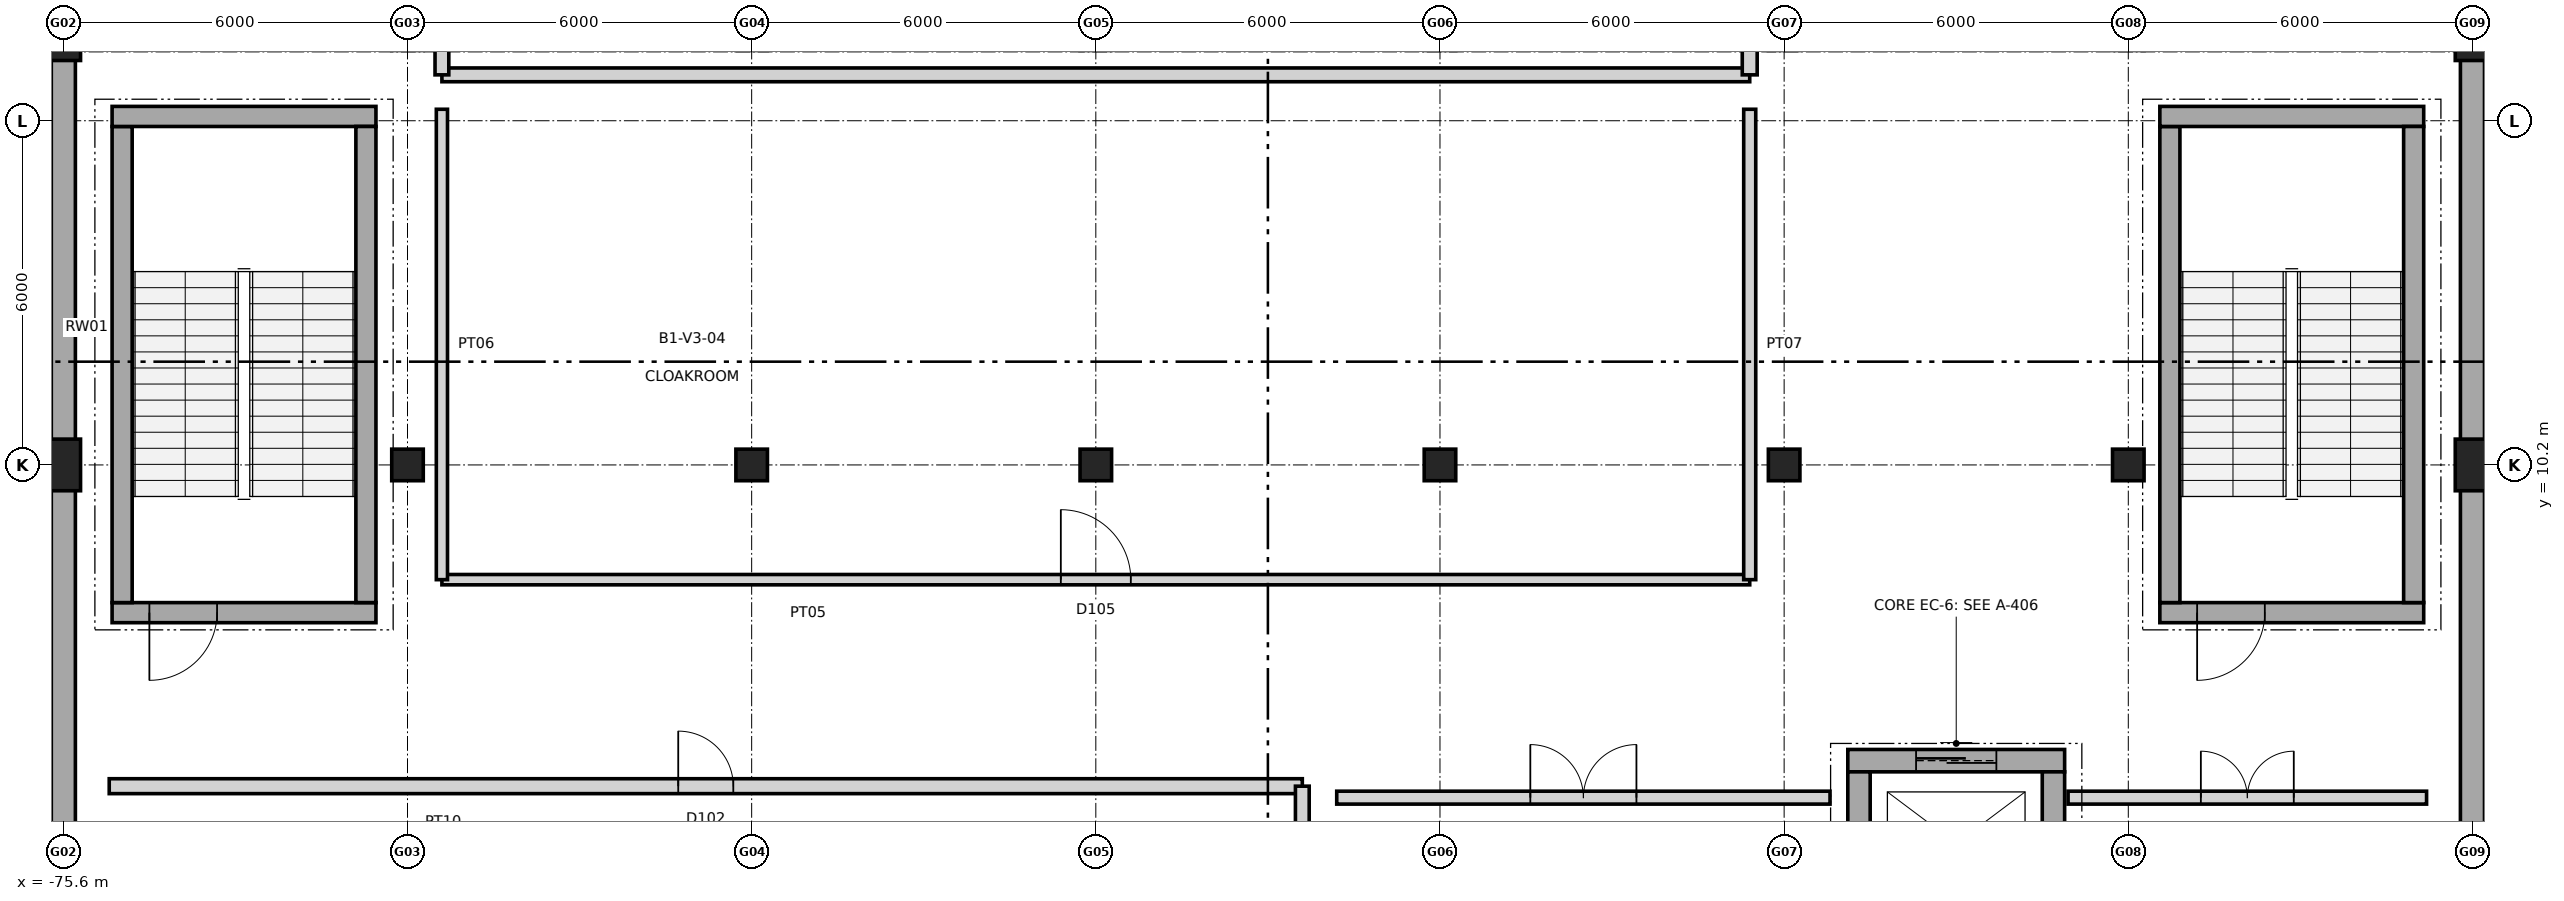
"""IFC4 building model, lengths in metres.
Left out: names, types, materials, properties, quantities, classifications, styles, units other than length and angle.
Written with IfcOpenShell. Run it as: python <this file> out.ifc"""

import sys

from ifc_helpers import new_model, si_unit, direction, frame, frame_2d, origin, origin_2d, place, context, subcontext, project, spatial, rectangle, extrude, element, fill, save


model = new_model("IFC4")
c1 = context("Model", 3, precision=1e-05, world=origin(), true_north=direction((0.0, 1.0)))
c2 = subcontext(c1, "Body", "Model", "MODEL_VIEW")
j1 = project(units=[si_unit("LENGTHUNIT", "METRE"), si_unit("PLANEANGLEUNIT", "RADIAN")], contexts=[c1])
p1 = place(None, origin())
s1 = spatial("IfcSite", under=j1, at=p1, CompositionType="ELEMENT")
p2 = place(p1, origin())
s2 = spatial("IfcBuilding", under=s1, at=p2, CompositionType="ELEMENT")
p3 = place(p2, frame((0.0, 0.0, -5.4)))
s3 = spatial("IfcBuildingStorey", under=s2, at=p3, CompositionType="ELEMENT", Elevation=-5.4)
for number, where, z_axis, x_axis in (
    (1, (-75.6, 10.2, 0.0), (0.0, 0.0, 1.0), (1.0, 0.0, 0.0)),
    (2, (-75.6, 17.7, 0.0), (0.0, 0.0, 1.0), (1.0, 0.0, 0.0)),
):
    element("IfcColumn", number, at=place(p3, frame(where, z_axis=z_axis, x_axis=x_axis)), inside=s3, PredefinedType="COLUMN", context=c2, shape_type="SweptSolid", body=[
        extrude(rectangle(XDim=0.6, YDim=0.9, at=origin_2d()), origin(), (0.0, 0.0, 1.0), 5.4),
    ])
for number, where, z_axis, x_axis in (
    (3, (-69.6, 10.2, 0.0), (0.0, 0.0, 1.0), (1.0, 0.0, 0.0)),
    (4, (-63.6, 10.2, 0.0), (0.0, 0.0, 1.0), (1.0, 0.0, 0.0)),
    (5, (-57.6, 10.2, 0.0), (0.0, 0.0, 1.0), (1.0, 0.0, 0.0)),
    (6, (-51.6, 10.2, 0.0), (0.0, 0.0, 1.0), (1.0, 0.0, 0.0)),
    (7, (-45.6, 10.2, 0.0), (0.0, 0.0, 1.0), (1.0, 0.0, 0.0)),
    (8, (-39.6, 10.2, 0.0), (0.0, 0.0, 1.0), (1.0, 0.0, 0.0)),
):
    element("IfcColumn", number, at=place(p3, frame(where, z_axis=z_axis, x_axis=x_axis)), inside=s3, PredefinedType="COLUMN", context=c2, shape_type="SweptSolid", body=[
        extrude(rectangle(XDim=0.55, YDim=0.55, at=origin_2d()), origin(), (0.0, 0.0, 1.0), 5.4),
    ])
for number, where, z_axis, x_axis in (
    (9, (-33.6, 10.2, 0.0), (0.0, 0.0, 1.0), (1.0, 0.0, 0.0)),
    (10, (-33.6, 17.7, 0.0), (0.0, 0.0, 1.0), (1.0, 0.0, 0.0)),
):
    element("IfcColumn", number, at=place(p3, frame(where, z_axis=z_axis, x_axis=x_axis)), inside=s3, PredefinedType="COLUMN", context=c2, shape_type="SweptSolid", body=[
        extrude(rectangle(XDim=0.6, YDim=0.9, at=origin_2d()), origin(), (0.0, 0.0, 1.0), 5.4),
    ])
for number, where, z_axis, x_axis in (
    (11, (-75.6, -16.35, 0.0), (0.0, 0.0, 1.0), (0.0, 1.0, 0.0)),
    (12, (-33.6, -16.35, 0.0), (0.0, 0.0, 1.0), (0.0, 1.0, 0.0)),
):
    element("IfcWall", number, at=place(p3, frame(where, z_axis=z_axis, x_axis=x_axis)), inside=s3, PredefinedType="USERDEFINED", context=c2, shape_type="SweptSolid", body=[
        extrude(rectangle(XDim=57.9, YDim=0.42, at=frame_2d((28.95, 0.0))), origin(), (0.0, 0.0, 1.0), 5.11),
    ])
p4 = place(p3, frame((-70.15, 7.625, 0.0), z_axis=(0.0, 0.0, 1.0), x_axis=(-1.0, 0.0, 0.0)))
e13 = element("IfcWall", 13, at=p4, inside=s3, PredefinedType="SHEAR", context=c2, shape_type="SweptSolid", body=[
    extrude(rectangle(XDim=4.6, YDim=0.35, at=frame_2d((2.3, 0.0))), origin(), (0.0, 0.0, 1.0), 5.4),
])
p5 = place(p4, frame((2.77, 0.0, 0.0)))
e14 = element("IfcOpeningElement", 14, at=p5, cuts=e13, PredefinedType="OPENING", context=c2, shape_type="SweptSolid", body=[
    extrude(rectangle(XDim=1.18, YDim=2.15, at=frame_2d((0.59, 1.075))), frame((0.0, 0.185, 0.0), z_axis=(0.0, -1.0, 0.0), x_axis=(1.0, 0.0, 0.0)), (0.0, 0.0, 1.0), 0.37),
])
p6 = place(p3, frame((-74.575, 7.8, 0.0), z_axis=(0.0, 0.0, 1.0), x_axis=(0.0, 1.0, 0.0)))
e15 = element("IfcWall", 15, at=p6, inside=s3, PredefinedType="SHEAR", context=c2, shape_type="SweptSolid", body=[
    extrude(rectangle(XDim=8.3, YDim=0.35, at=frame_2d((4.15, 0.0))), origin(), (0.0, 0.0, 1.0), 5.4),
])
p7 = place(p3, frame((-74.75, 16.275, 0.0), z_axis=(0.0, 0.0, 1.0), x_axis=(1.0, 0.0, 0.0)))
e16 = element("IfcWall", 16, at=p7, inside=s3, PredefinedType="SHEAR", context=c2, shape_type="SweptSolid", body=[
    extrude(rectangle(XDim=4.6, YDim=0.35, at=frame_2d((2.3, 0.0))), origin(), (0.0, 0.0, 1.0), 5.4),
])
p8 = place(p3, frame((-70.325, 16.1, 0.0), z_axis=(0.0, 0.0, 1.0), x_axis=(0.0, -1.0, 0.0)))
e17 = element("IfcWall", 17, at=p8, inside=s3, PredefinedType="SHEAR", context=c2, shape_type="SweptSolid", body=[
    extrude(rectangle(XDim=8.3, YDim=0.35, at=frame_2d((4.15, 0.0))), origin(), (0.0, 0.0, 1.0), 5.4),
])
p9 = place(p3, frame((-34.45, 7.625, 0.0), z_axis=(0.0, 0.0, 1.0), x_axis=(-1.0, 0.0, 0.0)))
e18 = element("IfcWall", 18, at=p9, inside=s3, PredefinedType="SHEAR", context=c2, shape_type="SweptSolid", body=[
    extrude(rectangle(XDim=4.6, YDim=0.35, at=frame_2d((2.3, 0.0))), origin(), (0.0, 0.0, 1.0), 5.4),
])
p10 = place(p9, frame((2.77, 0.0, 0.0)))
e19 = element("IfcOpeningElement", 19, at=p10, cuts=e18, PredefinedType="OPENING", context=c2, shape_type="SweptSolid", body=[
    extrude(rectangle(XDim=1.18, YDim=2.15, at=frame_2d((0.59, 1.075))), frame((0.0, 0.185, 0.0), z_axis=(0.0, -1.0, 0.0), x_axis=(1.0, 0.0, 0.0)), (0.0, 0.0, 1.0), 0.37),
])
p11 = place(p3, frame((-38.875, 7.8, 0.0), z_axis=(0.0, 0.0, 1.0), x_axis=(0.0, 1.0, 0.0)))
e20 = element("IfcWall", 20, at=p11, inside=s3, PredefinedType="SHEAR", context=c2, shape_type="SweptSolid", body=[
    extrude(rectangle(XDim=8.3, YDim=0.35, at=frame_2d((4.15, 0.0))), origin(), (0.0, 0.0, 1.0), 5.4),
])
p12 = place(p3, frame((-39.05, 16.275, 0.0), z_axis=(0.0, 0.0, 1.0), x_axis=(1.0, 0.0, 0.0)))
e21 = element("IfcWall", 21, at=p12, inside=s3, PredefinedType="SHEAR", context=c2, shape_type="SweptSolid", body=[
    extrude(rectangle(XDim=4.6, YDim=0.35, at=frame_2d((2.3, 0.0))), origin(), (0.0, 0.0, 1.0), 5.4),
])
p13 = place(p3, frame((-34.625, 16.1, 0.0), z_axis=(0.0, 0.0, 1.0), x_axis=(0.0, -1.0, 0.0)))
e22 = element("IfcWall", 22, at=p13, inside=s3, PredefinedType="SHEAR", context=c2, shape_type="SweptSolid", body=[
    extrude(rectangle(XDim=8.3, YDim=0.35, at=frame_2d((4.15, 0.0))), origin(), (0.0, 0.0, 1.0), 5.4),
])
p14 = place(p3, frame((-44.49, 5.045, 0.0), z_axis=(0.0, 0.0, 1.0), x_axis=(1.0, 0.0, 0.0)))
e23 = element("IfcWall", 23, at=p14, inside=s3, PredefinedType="SHEAR", context=c2, shape_type="SweptSolid", body=[
    extrude(rectangle(XDim=3.78, YDim=0.39, at=frame_2d((1.89, 0.0))), origin(), (0.0, 0.0, 1.0), 5.4),
])
p15 = place(p14, frame((1.19, 0.0, 0.0)))
e24 = element("IfcOpeningElement", 24, at=p15, cuts=e23, PredefinedType="OPENING", context=c2, shape_type="SweptSolid", body=[
    extrude(rectangle(XDim=1.4, YDim=2.2, at=frame_2d((0.7, 1.1))), frame((0.0, 0.205, 0.0), z_axis=(0.0, -1.0, 0.0), x_axis=(1.0, 0.0, 0.0)), (0.0, 0.0, 1.0), 0.41),
])
for number, where, z_axis, x_axis in (
    (25, (-44.295, 2.35, 0.0), (0.0, 0.0, 1.0), (0.0, 1.0, 0.0)),
    (26, (-40.905, 4.85, 0.0), (0.0, 0.0, 1.0), (0.0, -1.0, 0.0)),
):
    element("IfcWall", number, at=place(p3, frame(where, z_axis=z_axis, x_axis=x_axis)), inside=s3, PredefinedType="SHEAR", context=c2, shape_type="SweptSolid", body=[
        extrude(rectangle(XDim=2.5, YDim=0.39, at=frame_2d((1.25, 0.0))), origin(), (0.0, 0.0, 1.0), 5.4),
    ])
p16 = place(p3, frame((-74.8, 4.6, 0.0), z_axis=(0.0, 0.0, 1.0), x_axis=(1.0, 0.0, 0.0)))
e27 = element("IfcWall", 27, at=p16, inside=s3, PredefinedType="PARTITIONING", context=c2, shape_type="SweptSolid", body=[
    extrude(rectangle(XDim=20.8, YDim=0.26, at=frame_2d((10.4, 0.0))), origin(), (0.0, 0.0, 1.0), 5.02),
])
p17 = place(p16, frame((9.92, 0.0, 0.0)))
e28 = element("IfcOpeningElement", 28, at=p17, cuts=e27, PredefinedType="OPENING", context=c2, shape_type="SweptSolid", body=[
    extrude(rectangle(XDim=0.96, YDim=2.2, at=frame_2d((0.48, 1.1))), frame((0.0, 0.14, 0.0), z_axis=(0.0, -1.0, 0.0), x_axis=(1.0, 0.0, 0.0)), (0.0, 0.0, 1.0), 0.28),
])
p18 = place(p3, frame((-54.0, -16.0, 0.0), z_axis=(0.0, 0.0, 1.0), x_axis=(0.0, 1.0, 0.0)))
e29 = element("IfcWall", 29, at=p18, inside=s3, PredefinedType="PARTITIONING", context=c2, shape_type="SweptSolid", body=[
    extrude(rectangle(XDim=20.6, YDim=0.24, at=frame_2d((10.3, 0.0))), origin(), (0.0, 0.0, 1.0), 5.02),
])
p19 = place(p3, frame((-53.4, 4.4, 0.0), z_axis=(0.0, 0.0, 1.0), x_axis=(1.0, 0.0, 0.0)))
e30 = element("IfcWall", 30, at=p19, inside=s3, PredefinedType="PARTITIONING", context=c2, shape_type="SweptSolid", body=[
    extrude(rectangle(XDim=8.6, YDim=0.225, at=frame_2d((4.3, 0.0))), origin(), (0.0, 0.0, 1.0), 5.02),
])
p20 = place(p19, frame((3.375, 0.0, 0.0)))
e31 = element("IfcOpeningElement", 31, at=p20, cuts=e30, PredefinedType="OPENING", context=c2, shape_type="SweptSolid", body=[
    extrude(rectangle(XDim=1.85, YDim=2.3, at=frame_2d((0.925, 1.15))), frame((0.0, 0.123, 0.0), z_axis=(0.0, -1.0, 0.0), x_axis=(1.0, 0.0, 0.0)), (0.0, 0.0, 1.0), 0.245),
])
p21 = place(p3, frame((-69.0, 17.0, 0.0), z_axis=(0.0, 0.0, 1.0), x_axis=(1.0, 0.0, 0.0)))
e32 = element("IfcWall", 32, at=p21, inside=s3, PredefinedType="PARTITIONING", context=c2, shape_type="SweptSolid", body=[
    extrude(rectangle(XDim=22.8, YDim=0.24, at=frame_2d((11.4, 0.0))), origin(), (0.0, 0.0, 1.0), 5.02),
])
p22 = place(p3, frame((-69.0, 17.0, 0.0), z_axis=(0.0, 0.0, 1.0), x_axis=(0.0, 1.0, 0.0)))
e33 = element("IfcWall", 33, at=p22, inside=s3, PredefinedType="PARTITIONING", context=c2, shape_type="SweptSolid", body=[
    extrude(rectangle(XDim=7.4, YDim=0.24, at=frame_2d((3.7, 0.0))), origin(), (0.0, 0.0, 1.0), 5.02),
])
p23 = place(p22, frame((1.45, 0.0, 0.0)))
e34 = element("IfcOpeningElement", 34, at=p23, cuts=e33, PredefinedType="OPENING", context=c2, shape_type="SweptSolid", body=[
    extrude(rectangle(XDim=1.12, YDim=2.25, at=frame_2d((0.56, 1.125))), frame((0.0, 0.13, 0.0), z_axis=(0.0, -1.0, 0.0), x_axis=(1.0, 0.0, 0.0)), (0.0, 0.0, 1.0), 0.26),
])
p24 = place(p3, frame((-46.2, 17.0, 0.0), z_axis=(0.0, 0.0, 1.0), x_axis=(0.0, 1.0, 0.0)))
e35 = element("IfcWall", 35, at=p24, inside=s3, PredefinedType="PARTITIONING", context=c2, shape_type="SweptSolid", body=[
    extrude(rectangle(XDim=7.4, YDim=0.26, at=frame_2d((3.7, 0.0))), origin(), (0.0, 0.0, 1.0), 5.02),
])
p25 = place(p3, frame((-69.0, 8.2, 0.0), z_axis=(0.0, 0.0, 1.0), x_axis=(1.0, 0.0, 0.0)))
e36 = element("IfcWall", 36, at=p25, inside=s3, PredefinedType="PARTITIONING", context=c2, shape_type="SweptSolid", body=[
    extrude(rectangle(XDim=22.8, YDim=0.18, at=frame_2d((11.4, 0.0))), origin(), (0.0, 0.0, 1.0), 5.02),
])
p26 = place(p25, frame((10.79, 0.0, 0.0)))
e37 = element("IfcOpeningElement", 37, at=p26, cuts=e36, PredefinedType="OPENING", context=c2, shape_type="SweptSolid", body=[
    extrude(rectangle(XDim=1.22, YDim=2.3, at=frame_2d((0.61, 1.15))), frame((0.0, 0.1, 0.0), z_axis=(0.0, -1.0, 0.0), x_axis=(1.0, 0.0, 0.0)), (0.0, 0.0, 1.0), 0.2),
])
p27 = place(p3, frame((-69.0, 8.2, 0.0), z_axis=(0.0, 0.0, 1.0), x_axis=(0.0, 1.0, 0.0)))
e38 = element("IfcWall", 38, at=p27, inside=s3, PredefinedType="PARTITIONING", context=c2, shape_type="SweptSolid", body=[
    extrude(rectangle(XDim=8.2, YDim=0.195, at=frame_2d((4.1, 0.0))), origin(), (0.0, 0.0, 1.0), 5.02),
])
p28 = place(p3, frame((-46.2, 8.2, 0.0), z_axis=(0.0, 0.0, 1.0), x_axis=(0.0, 1.0, 0.0)))
e39 = element("IfcWall", 39, at=p28, inside=s3, PredefinedType="PARTITIONING", context=c2, shape_type="SweptSolid", body=[
    extrude(rectangle(XDim=8.2, YDim=0.21, at=frame_2d((4.1, 0.0))), origin(), (0.0, 0.0, 1.0), 5.02),
])
p29 = place(p3, frame((-40.65, 4.4, 0.0), z_axis=(0.0, 0.0, 1.0), x_axis=(1.0, 0.0, 0.0)))
e40 = element("IfcWall", 40, at=p29, inside=s3, PredefinedType="PARTITIONING", context=c2, shape_type="SweptSolid", body=[
    extrude(rectangle(XDim=6.25, YDim=0.225, at=frame_2d((3.125, 0.0))), origin(), (0.0, 0.0, 1.0), 5.02),
])
p30 = place(p29, frame((2.315, 0.0, 0.0)))
e41 = element("IfcOpeningElement", 41, at=p30, cuts=e40, PredefinedType="OPENING", context=c2, shape_type="SweptSolid", body=[
    extrude(rectangle(XDim=1.62, YDim=2.2, at=frame_2d((0.81, 1.1))), frame((0.0, 0.123, 0.0), z_axis=(0.0, -1.0, 0.0), x_axis=(1.0, 0.0, 0.0)), (0.0, 0.0, 1.0), 0.245),
])
p31 = place(p5, origin())
e42 = element("IfcDoor", 42, at=p31, inside=s3, OperationType="SINGLE_SWING_RIGHT", PredefinedType="DOOR", context=c2, shape_type="SweptSolid", body=[
    extrude(rectangle(XDim=1.18, YDim=2.15, at=frame_2d((0.59, 1.075))), frame((0.0, 0.025, 0.0), z_axis=(0.0, -1.0, 0.0), x_axis=(1.0, 0.0, 0.0)), (0.0, 0.0, 1.0), 0.05),
])
fill(e14, e42)
p32 = place(p10, origin())
e43 = element("IfcDoor", 43, at=p32, inside=s3, OperationType="SINGLE_SWING_RIGHT", PredefinedType="DOOR", context=c2, shape_type="SweptSolid", body=[
    extrude(rectangle(XDim=1.18, YDim=2.15, at=frame_2d((0.59, 1.075))), frame((0.0, 0.025, 0.0), z_axis=(0.0, -1.0, 0.0), x_axis=(1.0, 0.0, 0.0)), (0.0, 0.0, 1.0), 0.05),
])
fill(e19, e43)
p33 = place(p15, origin())
e44 = element("IfcDoor", 44, at=p33, inside=s3, OperationType="SLIDING_TO_LEFT", PredefinedType="DOOR", context=c2, shape_type="SweptSolid", body=[
    extrude(rectangle(XDim=1.4, YDim=2.2, at=frame_2d((0.7, 1.1))), frame((0.0, 0.025, 0.0), z_axis=(0.0, -1.0, 0.0), x_axis=(1.0, 0.0, 0.0)), (0.0, 0.0, 1.0), 0.05),
])
fill(e24, e44)
p34 = place(p17, origin())
e45 = element("IfcDoor", 45, at=p34, inside=s3, OperationType="SINGLE_SWING_LEFT", PredefinedType="DOOR", context=c2, shape_type="SweptSolid", body=[
    extrude(rectangle(XDim=0.96, YDim=2.2, at=frame_2d((0.48, 1.1))), frame((0.0, 0.025, 0.0), z_axis=(0.0, -1.0, 0.0), x_axis=(1.0, 0.0, 0.0)), (0.0, 0.0, 1.0), 0.05),
])
fill(e28, e45)
p35 = place(p20, origin())
e46 = element("IfcDoor", 46, at=p35, inside=s3, OperationType="DOUBLE_DOOR_SINGLE_SWING", PredefinedType="DOOR", context=c2, shape_type="SweptSolid", body=[
    extrude(rectangle(XDim=1.85, YDim=2.3, at=frame_2d((0.925, 1.15))), frame((0.0, 0.025, 0.0), z_axis=(0.0, -1.0, 0.0), x_axis=(1.0, 0.0, 0.0)), (0.0, 0.0, 1.0), 0.05),
])
fill(e31, e46)
p36 = place(p26, origin())
e47 = element("IfcDoor", 47, at=p36, inside=s3, OperationType="SINGLE_SWING_LEFT", PredefinedType="DOOR", context=c2, shape_type="SweptSolid", body=[
    extrude(rectangle(XDim=1.22, YDim=2.3, at=frame_2d((0.61, 1.15))), frame((0.0, 0.025, 0.0), z_axis=(0.0, -1.0, 0.0), x_axis=(1.0, 0.0, 0.0)), (0.0, 0.0, 1.0), 0.05),
])
fill(e37, e47)
p37 = place(p30, origin())
e48 = element("IfcDoor", 48, at=p37, inside=s3, OperationType="DOUBLE_DOOR_SINGLE_SWING", PredefinedType="DOOR", context=c2, shape_type="SweptSolid", body=[
    extrude(rectangle(XDim=1.62, YDim=2.2, at=frame_2d((0.81, 1.1))), frame((0.0, 0.025, 0.0), z_axis=(0.0, -1.0, 0.0), x_axis=(1.0, 0.0, 0.0)), (0.0, 0.0, 1.0), 0.05),
])
fill(e41, e48)
save(model, sys.argv[1])
